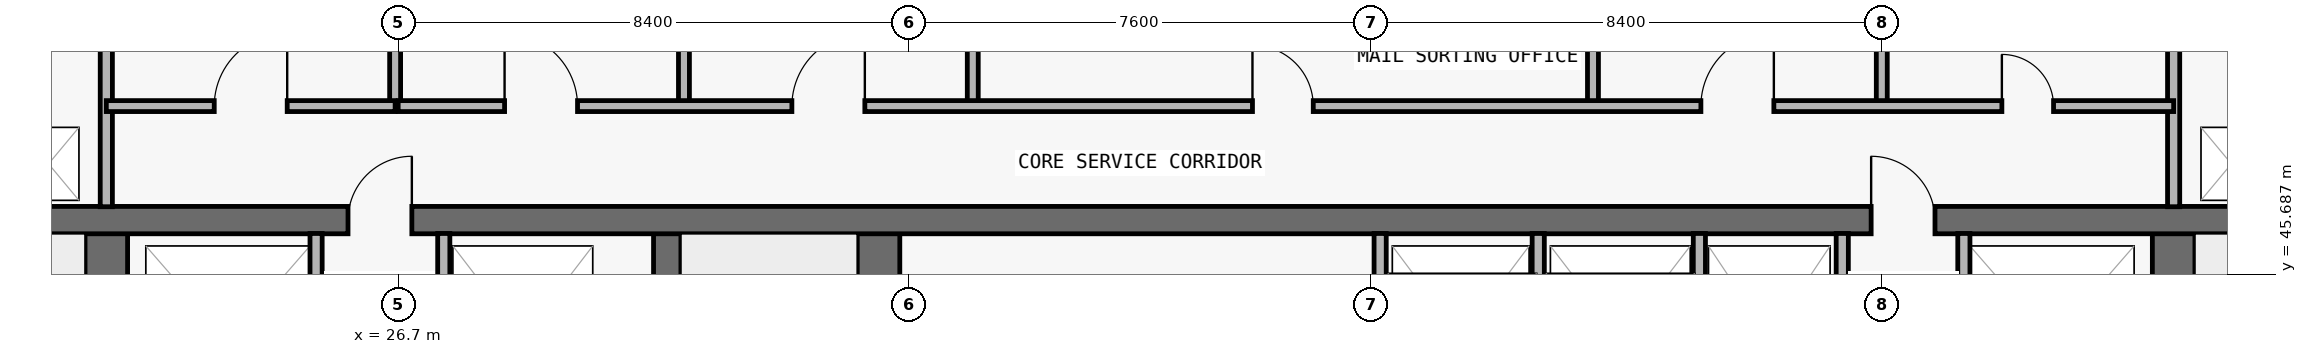
"""IFC4 building model, lengths in metres.
Left out: names, types, materials, properties, quantities, classifications, styles, units other than length and angle.
Written with IfcOpenShell. Run it as: python <this file> out.ifc"""

import sys

from ifc_helpers import new_model, si_unit, direction, frame, frame_2d, origin, place, context, subcontext, project, spatial, rectangle, extrude, element, fill, save


model = new_model("IFC4")
c1 = context("Model", 3, precision=1e-05, world=origin(), true_north=direction((0.0, 1.0)))
c2 = subcontext(c1, "Body", "Model", "MODEL_VIEW")
j1 = project(units=[si_unit("LENGTHUNIT", "METRE"), si_unit("PLANEANGLEUNIT", "RADIAN")], contexts=[c1])
p1 = place(None, origin())
s1 = spatial("IfcSite", under=j1, at=p1, CompositionType="ELEMENT")
p2 = place(p1, origin())
s2 = spatial("IfcBuilding", under=s1, at=p2, CompositionType="ELEMENT")
p3 = place(p2, frame((0.0, 0.0, 125.7)))
s3 = spatial("IfcBuildingStorey", under=s2, at=p3, CompositionType="ELEMENT", Elevation=125.7)
p4 = place(p3, frame((21.9, 36.95, 0.0), z_axis=(0.0, 0.0, 1.0), x_axis=(0.0, 1.0, 0.0)))
e1 = element("IfcWall", 1, at=p4, inside=s3, PredefinedType="SHEAR", context=c2, shape_type="SweptSolid", body=[
    extrude(rectangle(XDim=9.625, YDim=0.7, at=frame_2d((4.812, 0.0))), origin(), (0.0, 0.0, 1.0), 3.05),
])
p5 = place(p4, frame((0.6, 0.0, 0.0)))
e2 = element("IfcOpeningElement", 2, at=p5, cuts=e1, PredefinedType="OPENING", context=c2, shape_type="SweptSolid", body=[
    extrude(rectangle(XDim=1.1, YDim=2.15, at=frame_2d((0.55, 1.075))), frame((0.0, 0.36, 0.0), z_axis=(0.0, -1.0, 0.0), x_axis=(1.0, 0.0, 0.0)), (0.0, 0.0, 1.0), 0.72),
])
p6 = place(p3, frame((55.9, 36.95, 0.0), z_axis=(0.0, 0.0, 1.0), x_axis=(0.0, 1.0, 0.0)))
e3 = element("IfcWall", 3, at=p6, inside=s3, PredefinedType="SHEAR", context=c2, shape_type="SweptSolid", body=[
    extrude(rectangle(XDim=9.625, YDim=0.7, at=frame_2d((4.812, 0.0))), origin(), (0.0, 0.0, 1.0), 3.05),
])
p7 = place(p6, frame((0.6, 0.0, 0.0)))
e4 = element("IfcOpeningElement", 4, at=p7, cuts=e3, PredefinedType="OPENING", context=c2, shape_type="SweptSolid", body=[
    extrude(rectangle(XDim=1.1, YDim=2.15, at=frame_2d((0.55, 1.075))), frame((0.0, 0.36, 0.0), z_axis=(0.0, -1.0, 0.0), x_axis=(1.0, 0.0, 0.0)), (0.0, 0.0, 1.0), 0.72),
])
p8 = place(p3, frame((31.125, 36.95, 0.0), z_axis=(0.0, 0.0, 1.0), x_axis=(0.0, 1.0, 0.0)))
e5 = element("IfcWall", 5, at=p8, inside=s3, PredefinedType="SHEAR", context=c2, shape_type="SweptSolid", body=[
    extrude(rectangle(XDim=9.625, YDim=0.45, at=frame_2d((4.812, 0.0))), origin(), (0.0, 0.0, 1.0), 3.05),
])
p9 = place(p3, frame((34.6, 36.95, 0.0), z_axis=(0.0, 0.0, 1.0), x_axis=(0.0, 1.0, 0.0)))
e6 = element("IfcWall", 6, at=p9, inside=s3, PredefinedType="SHEAR", context=c2, shape_type="SweptSolid", body=[
    extrude(rectangle(XDim=9.625, YDim=0.7, at=frame_2d((4.812, 0.0))), origin(), (0.0, 0.0, 1.0), 3.05),
])
p10 = place(p3, frame((18.25, 46.575, 0.0), z_axis=(0.0, 0.0, 1.0), x_axis=(1.0, 0.0, 0.0)))
e7 = element("IfcWall", 7, at=p10, inside=s3, PredefinedType="SHEAR", context=c2, shape_type="SweptSolid", body=[
    extrude(rectangle(XDim=41.3, YDim=0.45, at=frame_2d((20.65, 0.0))), origin(), (0.0, 0.0, 1.0), 3.05),
])
p11 = place(p10, frame((7.625, 0.0, 0.0)))
e8 = element("IfcOpeningElement", 8, at=p11, cuts=e7, PredefinedType="OPENING", context=c2, shape_type="SweptSolid", body=[
    extrude(rectangle(XDim=1.05, YDim=2.15, at=frame_2d((0.525, 1.075))), frame((0.0, 0.235, 0.0), z_axis=(0.0, -1.0, 0.0), x_axis=(1.0, 0.0, 0.0)), (0.0, 0.0, 1.0), 0.47),
])
p12 = place(p10, frame((32.675, 0.0, 0.0)))
e9 = element("IfcOpeningElement", 9, at=p12, cuts=e7, PredefinedType="OPENING", context=c2, shape_type="SweptSolid", body=[
    extrude(rectangle(XDim=1.05, YDim=2.15, at=frame_2d((0.525, 1.075))), frame((0.0, 0.235, 0.0), z_axis=(0.0, -1.0, 0.0), x_axis=(1.0, 0.0, 0.0)), (0.0, 0.0, 1.0), 0.47),
])
p13 = place(p3, frame((21.9, 46.795, 0.0), z_axis=(0.0, 0.0, 1.0), x_axis=(0.0, 1.0, 0.0)))
e10 = element("IfcWall", 10, at=p13, inside=s3, PredefinedType="PARTITIONING", context=c2, shape_type="SweptSolid", body=[
    extrude(rectangle(XDim=3.16, YDim=0.2, at=frame_2d((1.58, 0.0))), origin(), (0.0, 0.0, 1.0), 3.05),
])
p14 = place(p3, frame((25.35, 43.17, 0.0), z_axis=(0.0, 0.0, 1.0), x_axis=(0.0, 1.0, 0.0)))
e11 = element("IfcWall", 11, at=p14, inside=s3, PredefinedType="PARTITIONING", context=c2, shape_type="SweptSolid", body=[
    extrude(rectangle(XDim=3.185, YDim=0.2, at=frame_2d((1.593, 0.0))), origin(), (0.0, 0.0, 1.0), 3.05),
])
p15 = place(p3, frame((26.65, 48.45, 0.0), z_axis=(0.0, 0.0, 1.0), x_axis=(0.0, 1.0, 0.0)))
e12 = element("IfcWall", 12, at=p15, inside=s3, PredefinedType="PARTITIONING", context=c2, shape_type="SweptSolid", body=[
    extrude(rectangle(XDim=1.505, YDim=0.18, at=frame_2d((0.752, 0.0))), origin(), (0.0, 0.0, 1.0), 3.05),
])
p16 = place(p3, frame((27.45, 43.17, 0.0), z_axis=(0.0, 0.0, 1.0), x_axis=(0.0, 1.0, 0.0)))
e13 = element("IfcWall", 13, at=p16, inside=s3, PredefinedType="PARTITIONING", context=c2, shape_type="SweptSolid", body=[
    extrude(rectangle(XDim=3.185, YDim=0.2, at=frame_2d((1.593, 0.0))), origin(), (0.0, 0.0, 1.0), 3.05),
])
for number, where, z_axis, x_axis in (
    (14, (31.4, 48.45, 0.0), (0.0, 0.0, 1.0), (0.0, 1.0, 0.0)),
    (15, (36.15, 48.45, 0.0), (0.0, 0.0, 1.0), (0.0, 1.0, 0.0)),
):
    element("IfcWall", number, at=place(p3, frame(where, z_axis=z_axis, x_axis=x_axis)), inside=s3, PredefinedType="PARTITIONING", context=c2, shape_type="SweptSolid", body=[
        extrude(rectangle(XDim=1.505, YDim=0.18, at=frame_2d((0.752, 0.0))), origin(), (0.0, 0.0, 1.0), 3.05),
    ])
for number, where, z_axis, x_axis in (
    (16, (42.85, 43.17, 0.0), (0.0, 0.0, 1.0), (0.0, 1.0, 0.0)),
    (17, (45.45, 43.17, 0.0), (0.0, 0.0, 1.0), (0.0, 1.0, 0.0)),
):
    element("IfcWall", number, at=place(p3, frame(where, z_axis=z_axis, x_axis=x_axis)), inside=s3, PredefinedType="PARTITIONING", context=c2, shape_type="SweptSolid", body=[
        extrude(rectangle(XDim=3.185, YDim=0.2, at=frame_2d((1.593, 0.0))), origin(), (0.0, 0.0, 1.0), 3.05),
    ])
p17 = place(p3, frame((46.35, 48.45, 0.0), z_axis=(0.0, 0.0, 1.0), x_axis=(0.0, 1.0, 0.0)))
e18 = element("IfcWall", 18, at=p17, inside=s3, PredefinedType="PARTITIONING", context=c2, shape_type="SweptSolid", body=[
    extrude(rectangle(XDim=1.505, YDim=0.18, at=frame_2d((0.752, 0.0))), origin(), (0.0, 0.0, 1.0), 3.05),
])
for number, where, z_axis, x_axis in (
    (19, (48.1, 43.17, 0.0), (0.0, 0.0, 1.0), (0.0, 1.0, 0.0)),
    (20, (50.45, 43.17, 0.0), (0.0, 0.0, 1.0), (0.0, 1.0, 0.0)),
):
    element("IfcWall", number, at=place(p3, frame(where, z_axis=z_axis, x_axis=x_axis)), inside=s3, PredefinedType="PARTITIONING", context=c2, shape_type="SweptSolid", body=[
        extrude(rectangle(XDim=3.185, YDim=0.2, at=frame_2d((1.593, 0.0))), origin(), (0.0, 0.0, 1.0), 3.05),
    ])
p18 = place(p3, frame((51.1, 48.45, 0.0), z_axis=(0.0, 0.0, 1.0), x_axis=(0.0, 1.0, 0.0)))
e21 = element("IfcWall", 21, at=p18, inside=s3, PredefinedType="PARTITIONING", context=c2, shape_type="SweptSolid", body=[
    extrude(rectangle(XDim=1.505, YDim=0.18, at=frame_2d((0.752, 0.0))), origin(), (0.0, 0.0, 1.0), 3.05),
])
p19 = place(p3, frame((52.45, 43.17, 0.0), z_axis=(0.0, 0.0, 1.0), x_axis=(0.0, 1.0, 0.0)))
e22 = element("IfcWall", 22, at=p19, inside=s3, PredefinedType="PARTITIONING", context=c2, shape_type="SweptSolid", body=[
    extrude(rectangle(XDim=3.185, YDim=0.2, at=frame_2d((1.593, 0.0))), origin(), (0.0, 0.0, 1.0), 3.05),
])
p20 = place(p3, frame((55.9, 46.795, 0.0), z_axis=(0.0, 0.0, 1.0), x_axis=(0.0, 1.0, 0.0)))
e23 = element("IfcWall", 23, at=p20, inside=s3, PredefinedType="PARTITIONING", context=c2, shape_type="SweptSolid", body=[
    extrude(rectangle(XDim=3.16, YDim=0.2, at=frame_2d((1.58, 0.0))), origin(), (0.0, 0.0, 1.0), 3.05),
])
p21 = place(p3, frame((21.9, 48.45, 0.0), z_axis=(0.0, 0.0, 1.0), x_axis=(1.0, 0.0, 0.0)))
e24 = element("IfcWall", 24, at=p21, inside=s3, PredefinedType="PARTITIONING", context=c2, shape_type="SweptSolid", body=[
    extrude(rectangle(XDim=4.75, YDim=0.18, at=frame_2d((2.375, 0.0))), origin(), (0.0, 0.0, 1.0), 3.05),
])
p22 = place(p21, frame((1.775, 0.0, 0.0)))
e25 = element("IfcOpeningElement", 25, at=p22, cuts=e24, PredefinedType="OPENING", context=c2, shape_type="SweptSolid", body=[
    extrude(rectangle(XDim=1.2, YDim=2.2, at=frame_2d((0.6, 1.1))), frame((0.0, 0.1, 0.0), z_axis=(0.0, -1.0, 0.0), x_axis=(1.0, 0.0, 0.0)), (0.0, 0.0, 1.0), 0.2),
])
p23 = place(p3, frame((26.7, 48.45, 0.0), z_axis=(0.0, 0.0, 1.0), x_axis=(1.0, 0.0, 0.0)))
e26 = element("IfcWall", 26, at=p23, inside=s3, PredefinedType="PARTITIONING", context=c2, shape_type="SweptSolid", body=[
    extrude(rectangle(XDim=29.2, YDim=0.18, at=frame_2d((14.6, 0.0))), origin(), (0.0, 0.0, 1.0), 3.05),
])
p24 = place(p23, frame((1.75, 0.0, 0.0)))
e27 = element("IfcOpeningElement", 27, at=p24, cuts=e26, PredefinedType="OPENING", context=c2, shape_type="SweptSolid", body=[
    extrude(rectangle(XDim=1.2, YDim=2.2, at=frame_2d((0.6, 1.1))), frame((0.0, 0.1, 0.0), z_axis=(0.0, -1.0, 0.0), x_axis=(1.0, 0.0, 0.0)), (0.0, 0.0, 1.0), 0.2),
])
p25 = place(p23, frame((6.475, 0.0, 0.0)))
e28 = element("IfcOpeningElement", 28, at=p25, cuts=e26, PredefinedType="OPENING", context=c2, shape_type="SweptSolid", body=[
    extrude(rectangle(XDim=1.2, YDim=2.2, at=frame_2d((0.6, 1.1))), frame((0.0, 0.1, 0.0), z_axis=(0.0, -1.0, 0.0), x_axis=(1.0, 0.0, 0.0)), (0.0, 0.0, 1.0), 0.2),
])
p26 = place(p23, frame((14.05, 0.0, 0.0)))
e29 = element("IfcOpeningElement", 29, at=p26, cuts=e26, PredefinedType="OPENING", context=c2, shape_type="SweptSolid", body=[
    extrude(rectangle(XDim=1.0, YDim=2.2, at=frame_2d((0.5, 1.1))), frame((0.0, 0.1, 0.0), z_axis=(0.0, -1.0, 0.0), x_axis=(1.0, 0.0, 0.0)), (0.0, 0.0, 1.0), 0.2),
])
p27 = place(p23, frame((21.425, 0.0, 0.0)))
e30 = element("IfcOpeningElement", 30, at=p27, cuts=e26, PredefinedType="OPENING", context=c2, shape_type="SweptSolid", body=[
    extrude(rectangle(XDim=1.2, YDim=2.2, at=frame_2d((0.6, 1.1))), frame((0.0, 0.1, 0.0), z_axis=(0.0, -1.0, 0.0), x_axis=(1.0, 0.0, 0.0)), (0.0, 0.0, 1.0), 0.2),
])
p28 = place(p23, frame((26.375, 0.0, 0.0)))
e31 = element("IfcOpeningElement", 31, at=p28, cuts=e26, PredefinedType="OPENING", context=c2, shape_type="SweptSolid", body=[
    extrude(rectangle(XDim=0.85, YDim=2.1, at=frame_2d((0.425, 1.05))), frame((0.0, 0.1, 0.0), z_axis=(0.0, -1.0, 0.0), x_axis=(1.0, 0.0, 0.0)), (0.0, 0.0, 1.0), 0.2),
])
p29 = place(p11, origin())
e32 = element("IfcDoor", 32, at=p29, inside=s3, OperationType="SINGLE_SWING_RIGHT", PredefinedType="DOOR", context=c2, shape_type="SweptSolid", body=[
    extrude(rectangle(XDim=1.05, YDim=2.15, at=frame_2d((0.525, 1.075))), frame((0.0, 0.025, 0.0), z_axis=(0.0, -1.0, 0.0), x_axis=(1.0, 0.0, 0.0)), (0.0, 0.0, 1.0), 0.05),
])
fill(e8, e32)
p30 = place(p12, origin())
e33 = element("IfcDoor", 33, at=p30, inside=s3, OperationType="SINGLE_SWING_LEFT", PredefinedType="DOOR", context=c2, shape_type="SweptSolid", body=[
    extrude(rectangle(XDim=1.05, YDim=2.15, at=frame_2d((0.525, 1.075))), frame((0.0, 0.025, 0.0), z_axis=(0.0, -1.0, 0.0), x_axis=(1.0, 0.0, 0.0)), (0.0, 0.0, 1.0), 0.05),
])
fill(e9, e33)
p31 = place(p22, origin())
e34 = element("IfcDoor", 34, at=p31, inside=s3, OperationType="SINGLE_SWING_RIGHT", PredefinedType="DOOR", context=c2, shape_type="SweptSolid", body=[
    extrude(rectangle(XDim=1.2, YDim=2.2, at=frame_2d((0.6, 1.1))), frame((0.0, 0.025, 0.0), z_axis=(0.0, -1.0, 0.0), x_axis=(1.0, 0.0, 0.0)), (0.0, 0.0, 1.0), 0.05),
])
fill(e25, e34)
p32 = place(p24, origin())
e35 = element("IfcDoor", 35, at=p32, inside=s3, OperationType="SINGLE_SWING_LEFT", PredefinedType="DOOR", context=c2, shape_type="SweptSolid", body=[
    extrude(rectangle(XDim=1.2, YDim=2.2, at=frame_2d((0.6, 1.1))), frame((0.0, 0.025, 0.0), z_axis=(0.0, -1.0, 0.0), x_axis=(1.0, 0.0, 0.0)), (0.0, 0.0, 1.0), 0.05),
])
fill(e27, e35)
p33 = place(p25, origin())
e36 = element("IfcDoor", 36, at=p33, inside=s3, OperationType="SINGLE_SWING_RIGHT", PredefinedType="DOOR", context=c2, shape_type="SweptSolid", body=[
    extrude(rectangle(XDim=1.2, YDim=2.2, at=frame_2d((0.6, 1.1))), frame((0.0, 0.025, 0.0), z_axis=(0.0, -1.0, 0.0), x_axis=(1.0, 0.0, 0.0)), (0.0, 0.0, 1.0), 0.05),
])
fill(e28, e36)
p34 = place(p26, origin())
e37 = element("IfcDoor", 37, at=p34, inside=s3, OperationType="SINGLE_SWING_LEFT", PredefinedType="DOOR", context=c2, shape_type="SweptSolid", body=[
    extrude(rectangle(XDim=1.0, YDim=2.2, at=frame_2d((0.5, 1.1))), frame((0.0, 0.025, 0.0), z_axis=(0.0, -1.0, 0.0), x_axis=(1.0, 0.0, 0.0)), (0.0, 0.0, 1.0), 0.05),
])
fill(e29, e37)
p35 = place(p27, origin())
e38 = element("IfcDoor", 38, at=p35, inside=s3, OperationType="SINGLE_SWING_RIGHT", PredefinedType="DOOR", context=c2, shape_type="SweptSolid", body=[
    extrude(rectangle(XDim=1.2, YDim=2.2, at=frame_2d((0.6, 1.1))), frame((0.0, 0.025, 0.0), z_axis=(0.0, -1.0, 0.0), x_axis=(1.0, 0.0, 0.0)), (0.0, 0.0, 1.0), 0.05),
])
fill(e30, e38)
p36 = place(p28, origin())
e39 = element("IfcDoor", 39, at=p36, inside=s3, OperationType="SINGLE_SWING_LEFT", PredefinedType="DOOR", context=c2, shape_type="SweptSolid", body=[
    extrude(rectangle(XDim=0.85, YDim=2.1, at=frame_2d((0.425, 1.05))), frame((0.0, 0.025, 0.0), z_axis=(0.0, -1.0, 0.0), x_axis=(1.0, 0.0, 0.0)), (0.0, 0.0, 1.0), 0.05),
])
fill(e31, e39)
save(model, sys.argv[1])
